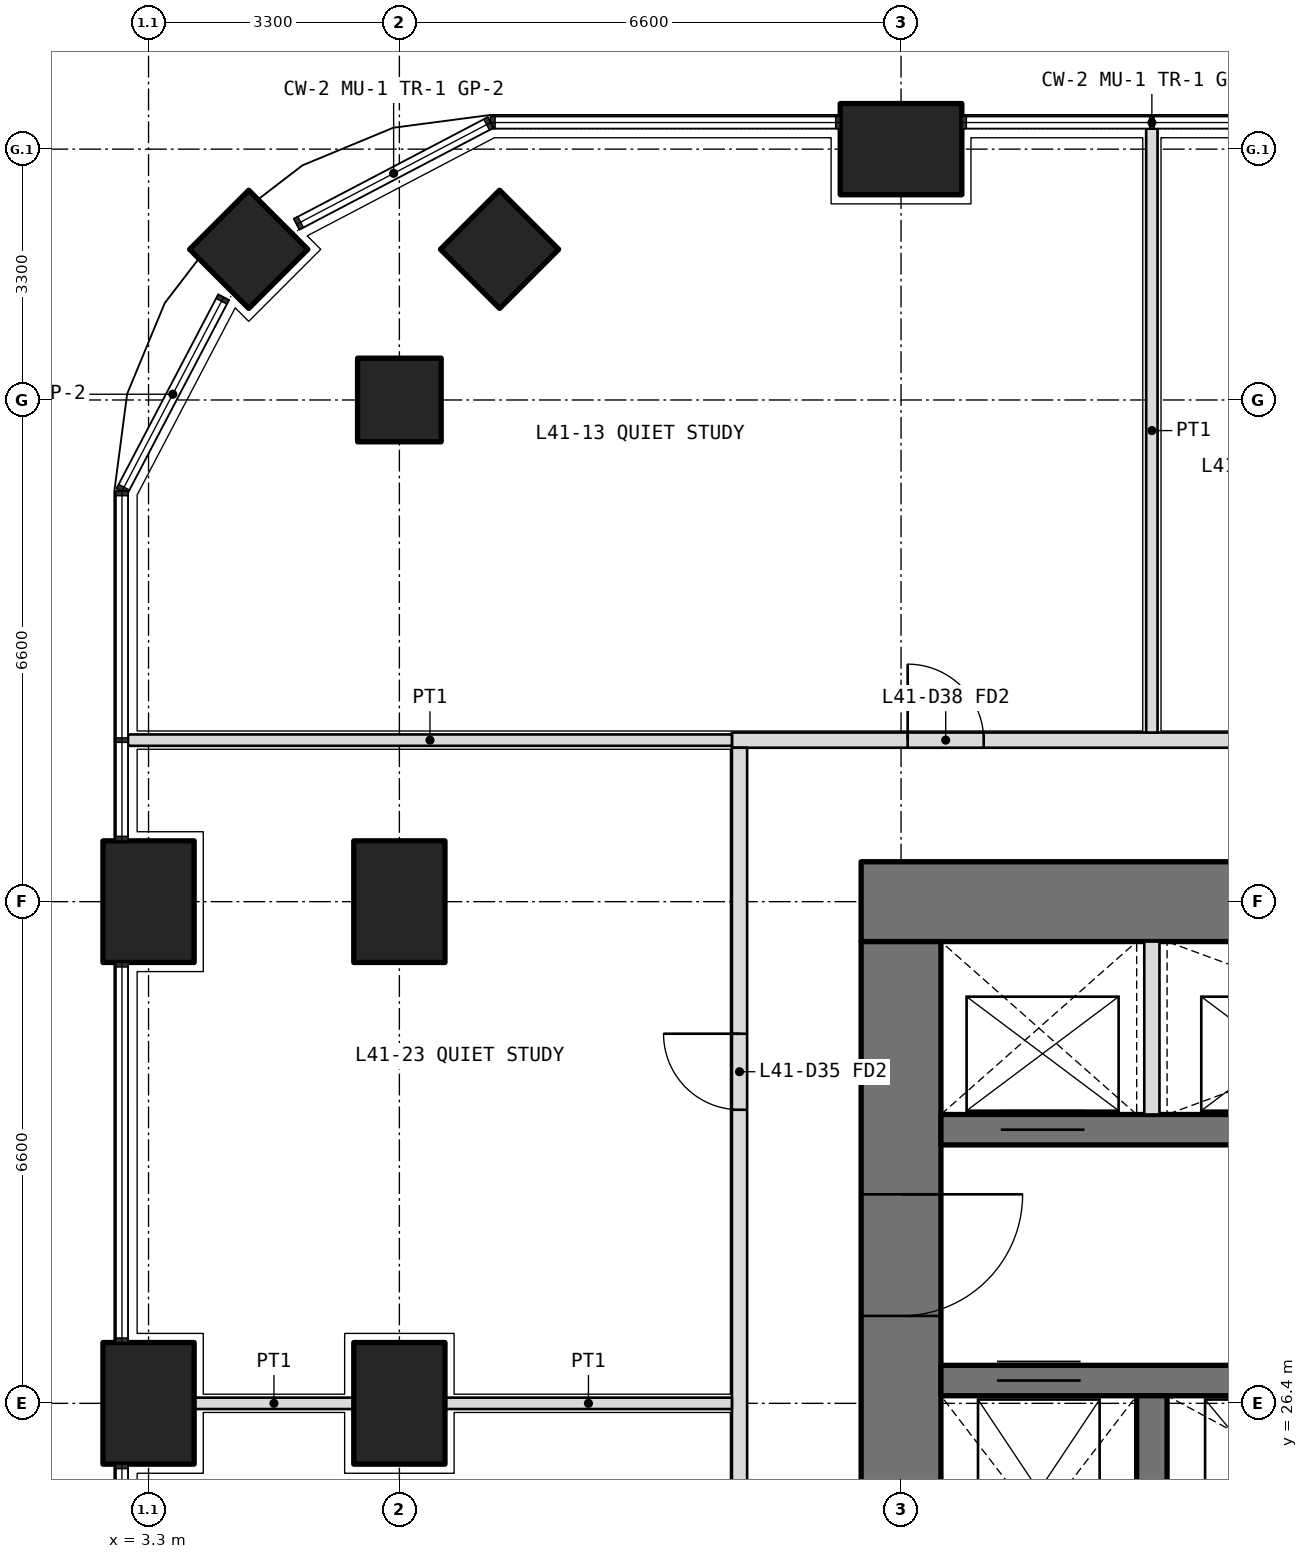
"""IFC4 building model, lengths in metres.
Left out: names, types, materials, properties, quantities, classifications, styles, units other than length and angle.
Written with IfcOpenShell. Run it as: python <this file> out.ifc"""

import sys

from ifc_helpers import new_model, si_unit, direction, frame, frame_2d, origin, origin_2d, place, context, subcontext, project, spatial, rectangle, extrude, element, fill, save


model = new_model("IFC4")
c1 = context("Model", 3, precision=1e-05, world=origin(), true_north=direction((0.0, 1.0)))
c2 = subcontext(c1, "Body", "Model", "MODEL_VIEW")
j1 = project(units=[si_unit("LENGTHUNIT", "METRE"), si_unit("PLANEANGLEUNIT", "RADIAN")], contexts=[c1])
p1 = place(None, origin())
s1 = spatial("IfcSite", under=j1, at=p1, CompositionType="ELEMENT")
p2 = place(p1, origin())
s2 = spatial("IfcBuilding", under=s1, at=p2, CompositionType="ELEMENT")
p3 = place(p2, frame((0.0, 0.0, 180.9)))
s3 = spatial("IfcBuildingStorey", under=s2, at=p3, CompositionType="ELEMENT", Elevation=180.9)
p4 = place(p3, frame((4.618, 41.582, 0.0), z_axis=(0.0, 0.0, 1.0), x_axis=(0.707106781187, 0.707106781187, 0.0)))
e1 = element("IfcColumn", 1, at=p4, inside=s3, PredefinedType="COLUMN", context=c2, shape_type="SweptSolid", body=[
    extrude(rectangle(XDim=1.1, YDim=1.1, at=origin_2d()), origin(), (0.0, 0.0, 1.0), 4.2),
])
for number, where, z_axis, x_axis in (
    (2, (3.3, 26.4, 0.0), (0.0, 0.0, 1.0), (0.0, 1.0, 0.0)),
    (3, (3.3, 33.0, 0.0), (0.0, 0.0, 1.0), (0.0, 1.0, 0.0)),
    (4, (13.2, 42.9, 0.0), (0.0, 0.0, 1.0), (1.0, 0.0, 0.0)),
):
    element("IfcColumn", number, at=place(p3, frame(where, z_axis=z_axis, x_axis=x_axis)), inside=s3, PredefinedType="COLUMN", context=c2, shape_type="SweptSolid", body=[
        extrude(rectangle(XDim=1.6, YDim=1.2, at=origin_2d()), origin(), (0.0, 0.0, 1.0), 4.2),
    ])
for number, where, z_axis, x_axis in (
    (5, (6.6, 39.6, 0.0), (0.0, 0.0, 1.0), (1.0, 0.0, 0.0)),
    (6, (7.918, 41.582, 0.0), (0.0, 0.0, 1.0), (0.707, 0.707, 0.0)),
):
    element("IfcColumn", number, at=place(p3, frame(where, z_axis=z_axis, x_axis=x_axis)), inside=s3, PredefinedType="COLUMN", context=c2, shape_type="SweptSolid", body=[
        extrude(rectangle(XDim=1.1, YDim=1.1, at=origin_2d()), origin(), (0.0, 0.0, 1.0), 4.2),
    ])
for number, where, z_axis, x_axis in (
    (7, (6.6, 26.4, 0.0), (0.0, 0.0, 1.0), (0.0, 1.0, 0.0)),
    (8, (6.6, 33.0, 0.0), (0.0, 0.0, 1.0), (0.0, 1.0, 0.0)),
):
    element("IfcColumn", number, at=place(p3, frame(where, z_axis=z_axis, x_axis=x_axis)), inside=s3, PredefinedType="COLUMN", context=c2, shape_type="SweptSolid", body=[
        extrude(rectangle(XDim=1.6, YDim=1.2, at=origin_2d()), origin(), (0.0, 0.0, 1.0), 4.2),
    ])
p5 = place(p3, frame((40.125, 33.0, 0.0), z_axis=(0.0, 0.0, 1.0), x_axis=(-1.0, 0.0, 0.0)))
e9 = element("IfcWall", 9, at=p5, inside=s3, PredefinedType="SHEAR", context=c2, shape_type="SweptSolid", body=[
    extrude(rectangle(XDim=27.45, YDim=1.05, at=frame_2d((13.725, 0.0))), origin(), (0.0, 0.0, 1.0), 4.2),
])
p6 = place(p3, frame((13.2, 32.475, 0.0), z_axis=(0.0, 0.0, 1.0), x_axis=(0.0, -1.0, 0.0)))
e10 = element("IfcWall", 10, at=p6, inside=s3, PredefinedType="SHEAR", context=c2, shape_type="SweptSolid", body=[
    extrude(rectangle(XDim=18.75, YDim=1.05, at=frame_2d((9.375, 0.0))), origin(), (0.0, 0.0, 1.0), 4.2),
])
p7 = place(p6, frame((14.125, 0.0, 0.0)))
e11 = element("IfcOpeningElement", 11, at=p7, cuts=e10, PredefinedType="OPENING", context=c2, shape_type="SweptSolid", body=[
    extrude(rectangle(XDim=1.6, YDim=2.1, at=frame_2d((0.8, 1.05))), frame((0.0, 0.535, 0.0), z_axis=(0.0, -1.0, 0.0), x_axis=(1.0, 0.0, 0.0)), (0.0, 0.0, 1.0), 1.07),
])
p8 = place(p6, frame((3.325, 0.0, 0.0)))
e12 = element("IfcOpeningElement", 12, at=p8, cuts=e10, PredefinedType="OPENING", context=c2, shape_type="SweptSolid", body=[
    extrude(rectangle(XDim=1.6, YDim=2.1, at=frame_2d((0.8, 1.05))), frame((0.0, 0.535, 0.0), z_axis=(0.0, -1.0, 0.0), x_axis=(1.0, 0.0, 0.0)), (0.0, 0.0, 1.0), 1.07),
])
p9 = place(p3, frame((13.725, 26.7, 0.0), z_axis=(0.0, 0.0, 1.0), x_axis=(1.0, 0.0, 0.0)))
e13 = element("IfcWall", 13, at=p9, inside=s3, PredefinedType="SHEAR", context=c2, shape_type="SweptSolid", body=[
    extrude(rectangle(XDim=25.35, YDim=0.4, at=frame_2d((12.675, 0.0))), origin(), (0.0, 0.0, 1.0), 4.2),
])
p10 = place(p9, frame((23.95, 0.0, 0.0)))
e14 = element("IfcOpeningElement", 14, at=p10, cuts=e13, PredefinedType="OPENING", context=c2, shape_type="SweptSolid", body=[
    extrude(rectangle(XDim=1.2, YDim=2.1, at=frame_2d((0.6, 1.05))), frame((0.0, 0.21, 0.0), z_axis=(0.0, -1.0, 0.0), x_axis=(1.0, 0.0, 0.0)), (0.0, 0.0, 1.0), 0.42),
])
p11 = place(p9, frame((0.738, 0.0, 0.0)))
e15 = element("IfcOpeningElement", 15, at=p11, cuts=e13, PredefinedType="OPENING", context=c2, shape_type="SweptSolid", body=[
    extrude(rectangle(XDim=1.1, YDim=2.1, at=frame_2d((0.55, 1.05))), frame((0.0, 0.21, 0.0), z_axis=(0.0, -1.0, 0.0), x_axis=(1.0, 0.0, 0.0)), (0.0, 0.0, 1.0), 0.42),
])
p12 = place(p9, frame((3.925, 0.0, 0.0)))
e16 = element("IfcOpeningElement", 16, at=p12, cuts=e13, PredefinedType="OPENING", context=c2, shape_type="SweptSolid", body=[
    extrude(rectangle(XDim=1.1, YDim=2.1, at=frame_2d((0.55, 1.05))), frame((0.0, 0.21, 0.0), z_axis=(0.0, -1.0, 0.0), x_axis=(1.0, 0.0, 0.0)), (0.0, 0.0, 1.0), 0.42),
])
p13 = place(p9, frame((7.175, 0.0, 0.0)))
e17 = element("IfcOpeningElement", 17, at=p13, cuts=e13, PredefinedType="OPENING", context=c2, shape_type="SweptSolid", body=[
    extrude(rectangle(XDim=1.1, YDim=2.1, at=frame_2d((0.55, 1.05))), frame((0.0, 0.21, 0.0), z_axis=(0.0, -1.0, 0.0), x_axis=(1.0, 0.0, 0.0)), (0.0, 0.0, 1.0), 0.42),
])
p14 = place(p9, frame((10.425, 0.0, 0.0)))
e18 = element("IfcOpeningElement", 18, at=p14, cuts=e13, PredefinedType="OPENING", context=c2, shape_type="SweptSolid", body=[
    extrude(rectangle(XDim=1.1, YDim=2.1, at=frame_2d((0.55, 1.05))), frame((0.0, 0.21, 0.0), z_axis=(0.0, -1.0, 0.0), x_axis=(1.0, 0.0, 0.0)), (0.0, 0.0, 1.0), 0.42),
])
p15 = place(p9, frame((13.775, 0.0, 0.0)))
e19 = element("IfcOpeningElement", 19, at=p15, cuts=e13, PredefinedType="OPENING", context=c2, shape_type="SweptSolid", body=[
    extrude(rectangle(XDim=1.1, YDim=2.1, at=frame_2d((0.55, 1.05))), frame((0.0, 0.21, 0.0), z_axis=(0.0, -1.0, 0.0), x_axis=(1.0, 0.0, 0.0)), (0.0, 0.0, 1.0), 0.42),
])
p16 = place(p3, frame((13.725, 30.0, 0.0), z_axis=(0.0, 0.0, 1.0), x_axis=(1.0, 0.0, 0.0)))
e20 = element("IfcWall", 20, at=p16, inside=s3, PredefinedType="SHEAR", context=c2, shape_type="SweptSolid", body=[
    extrude(rectangle(XDim=25.35, YDim=0.4, at=frame_2d((12.675, 0.0))), origin(), (0.0, 0.0, 1.0), 4.2),
])
p17 = place(p16, frame((0.788, 0.0, 0.0)))
e21 = element("IfcOpeningElement", 21, at=p17, cuts=e20, PredefinedType="OPENING", context=c2, shape_type="SweptSolid", body=[
    extrude(rectangle(XDim=1.1, YDim=2.1, at=frame_2d((0.55, 1.05))), frame((0.0, 0.21, 0.0), z_axis=(0.0, -1.0, 0.0), x_axis=(1.0, 0.0, 0.0)), (0.0, 0.0, 1.0), 0.42),
])
p18 = place(p16, frame((3.875, 0.0, 0.0)))
e22 = element("IfcOpeningElement", 22, at=p18, cuts=e20, PredefinedType="OPENING", context=c2, shape_type="SweptSolid", body=[
    extrude(rectangle(XDim=1.1, YDim=2.1, at=frame_2d((0.55, 1.05))), frame((0.0, 0.21, 0.0), z_axis=(0.0, -1.0, 0.0), x_axis=(1.0, 0.0, 0.0)), (0.0, 0.0, 1.0), 0.42),
])
p19 = place(p16, frame((7.175, 0.0, 0.0)))
e23 = element("IfcOpeningElement", 23, at=p19, cuts=e20, PredefinedType="OPENING", context=c2, shape_type="SweptSolid", body=[
    extrude(rectangle(XDim=1.1, YDim=2.1, at=frame_2d((0.55, 1.05))), frame((0.0, 0.21, 0.0), z_axis=(0.0, -1.0, 0.0), x_axis=(1.0, 0.0, 0.0)), (0.0, 0.0, 1.0), 0.42),
])
p20 = place(p16, frame((10.475, 0.0, 0.0)))
e24 = element("IfcOpeningElement", 24, at=p20, cuts=e20, PredefinedType="OPENING", context=c2, shape_type="SweptSolid", body=[
    extrude(rectangle(XDim=1.1, YDim=2.1, at=frame_2d((0.55, 1.05))), frame((0.0, 0.21, 0.0), z_axis=(0.0, -1.0, 0.0), x_axis=(1.0, 0.0, 0.0)), (0.0, 0.0, 1.0), 0.42),
])
p21 = place(p3, frame((16.5, 23.15, 0.0), z_axis=(0.0, 0.0, 1.0), x_axis=(0.0, 1.0, 0.0)))
e25 = element("IfcWall", 25, at=p21, inside=s3, PredefinedType="SHEAR", context=c2, shape_type="SweptSolid", body=[
    extrude(rectangle(XDim=3.35, YDim=0.4, at=frame_2d((1.675, 0.0))), origin(), (0.0, 0.0, 1.0), 4.2),
])
p22 = place(p3, frame((16.5, 30.2, 0.0), z_axis=(0.0, 0.0, 1.0), x_axis=(0.0, 1.0, 0.0)))
e26 = element("IfcWall", 26, at=p22, inside=s3, PredefinedType="PARTITIONING", context=c2, shape_type="SweptSolid", body=[
    extrude(rectangle(XDim=2.275, YDim=0.2, at=frame_2d((1.138, 0.0))), origin(), (0.0, 0.0, 1.0), 4.2),
])
p23 = place(p3, frame((10.975, 35.125, 0.0), z_axis=(0.0, 0.0, 1.0), x_axis=(1.0, 0.0, 0.0)))
e27 = element("IfcWall", 27, at=p23, inside=s3, PredefinedType="PARTITIONING", context=c2, shape_type="SweptSolid", body=[
    extrude(rectangle(XDim=30.85, YDim=0.2, at=frame_2d((15.425, 0.0))), origin(), (0.0, 0.0, 1.0), 2.85),
])
p24 = place(p23, frame((2.312, 0.0, 0.0)))
e28 = element("IfcOpeningElement", 28, at=p24, cuts=e27, PredefinedType="OPENING", context=c2, shape_type="SweptSolid", body=[
    extrude(rectangle(XDim=1.0, YDim=2.1, at=frame_2d((0.5, 1.05))), frame((0.0, 0.11, 0.0), z_axis=(0.0, -1.0, 0.0), x_axis=(1.0, 0.0, 0.0)), (0.0, 0.0, 1.0), 0.22),
])
p25 = place(p23, frame((7.125, 0.0, 0.0)))
e29 = element("IfcOpeningElement", 29, at=p25, cuts=e27, PredefinedType="OPENING", context=c2, shape_type="SweptSolid", body=[
    extrude(rectangle(XDim=1.0, YDim=2.1, at=frame_2d((0.5, 1.05))), frame((0.0, 0.11, 0.0), z_axis=(0.0, -1.0, 0.0), x_axis=(1.0, 0.0, 0.0)), (0.0, 0.0, 1.0), 0.22),
])
p26 = place(p23, frame((10.425, 0.0, 0.0)))
e30 = element("IfcOpeningElement", 30, at=p26, cuts=e27, PredefinedType="OPENING", context=c2, shape_type="SweptSolid", body=[
    extrude(rectangle(XDim=1.0, YDim=2.1, at=frame_2d((0.5, 1.05))), frame((0.0, 0.11, 0.0), z_axis=(0.0, -1.0, 0.0), x_axis=(1.0, 0.0, 0.0)), (0.0, 0.0, 1.0), 0.22),
])
p27 = place(p23, frame((16.575, 0.0, 0.0)))
e31 = element("IfcOpeningElement", 31, at=p27, cuts=e27, PredefinedType="OPENING", context=c2, shape_type="SweptSolid", body=[
    extrude(rectangle(XDim=1.0, YDim=2.1, at=frame_2d((0.5, 1.05))), frame((0.0, 0.11, 0.0), z_axis=(0.0, -1.0, 0.0), x_axis=(1.0, 0.0, 0.0)), (0.0, 0.0, 1.0), 0.22),
])
p28 = place(p23, frame((25.887, 0.0, 0.0)))
e32 = element("IfcOpeningElement", 32, at=p28, cuts=e27, PredefinedType="OPENING", context=c2, shape_type="SweptSolid", body=[
    extrude(rectangle(XDim=1.0, YDim=2.1, at=frame_2d((0.5, 1.05))), frame((0.0, 0.11, 0.0), z_axis=(0.0, -1.0, 0.0), x_axis=(1.0, 0.0, 0.0)), (0.0, 0.0, 1.0), 0.22),
])
p29 = place(p3, frame((11.075, 11.175, 0.0), z_axis=(0.0, 0.0, 1.0), x_axis=(0.0, 1.0, 0.0)))
e33 = element("IfcWall", 33, at=p29, inside=s3, PredefinedType="PARTITIONING", context=c2, shape_type="SweptSolid", body=[
    extrude(rectangle(XDim=23.85, YDim=0.2, at=frame_2d((11.925, 0.0))), origin(), (0.0, 0.0, 1.0), 2.85),
])
p30 = place(p29, frame((0.462, 0.0, 0.0)))
e34 = element("IfcOpeningElement", 34, at=p30, cuts=e33, PredefinedType="OPENING", context=c2, shape_type="SweptSolid", body=[
    extrude(rectangle(XDim=1.0, YDim=2.1, at=frame_2d((0.5, 1.05))), frame((0.0, 0.11, 0.0), z_axis=(0.0, -1.0, 0.0), x_axis=(1.0, 0.0, 0.0)), (0.0, 0.0, 1.0), 0.22),
])
p31 = place(p29, frame((2.575, 0.0, 0.0)))
e35 = element("IfcOpeningElement", 35, at=p31, cuts=e33, PredefinedType="OPENING", context=c2, shape_type="SweptSolid", body=[
    extrude(rectangle(XDim=1.0, YDim=2.1, at=frame_2d((0.5, 1.05))), frame((0.0, 0.11, 0.0), z_axis=(0.0, -1.0, 0.0), x_axis=(1.0, 0.0, 0.0)), (0.0, 0.0, 1.0), 0.22),
])
p32 = place(p29, frame((5.625, 0.0, 0.0)))
e36 = element("IfcOpeningElement", 36, at=p32, cuts=e33, PredefinedType="OPENING", context=c2, shape_type="SweptSolid", body=[
    extrude(rectangle(XDim=0.9, YDim=2.1, at=frame_2d((0.45, 1.05))), frame((0.0, 0.11, 0.0), z_axis=(0.0, -1.0, 0.0), x_axis=(1.0, 0.0, 0.0)), (0.0, 0.0, 1.0), 0.22),
])
p33 = place(p29, frame((9.425, 0.0, 0.0)))
e37 = element("IfcOpeningElement", 37, at=p33, cuts=e33, PredefinedType="OPENING", context=c2, shape_type="SweptSolid", body=[
    extrude(rectangle(XDim=0.9, YDim=2.1, at=frame_2d((0.45, 1.05))), frame((0.0, 0.11, 0.0), z_axis=(0.0, -1.0, 0.0), x_axis=(1.0, 0.0, 0.0)), (0.0, 0.0, 1.0), 0.22),
])
p34 = place(p29, frame((12.975, 0.0, 0.0)))
e38 = element("IfcOpeningElement", 38, at=p34, cuts=e33, PredefinedType="OPENING", context=c2, shape_type="SweptSolid", body=[
    extrude(rectangle(XDim=1.0, YDim=2.1, at=frame_2d((0.5, 1.05))), frame((0.0, 0.11, 0.0), z_axis=(0.0, -1.0, 0.0), x_axis=(1.0, 0.0, 0.0)), (0.0, 0.0, 1.0), 0.22),
])
p35 = place(p29, frame((19.087, 0.0, 0.0)))
e39 = element("IfcOpeningElement", 39, at=p35, cuts=e33, PredefinedType="OPENING", context=c2, shape_type="SweptSolid", body=[
    extrude(rectangle(XDim=1.0, YDim=2.1, at=frame_2d((0.5, 1.05))), frame((0.0, 0.11, 0.0), z_axis=(0.0, -1.0, 0.0), x_axis=(1.0, 0.0, 0.0)), (0.0, 0.0, 1.0), 0.22),
])
p36 = place(p3, frame((3.03, 35.125, 0.0), z_axis=(0.0, 0.0, 1.0), x_axis=(1.0, 0.0, 0.0)))
e40 = element("IfcWall", 40, at=p36, inside=s3, PredefinedType="PARTITIONING", context=c2, shape_type="SweptSolid", body=[
    extrude(rectangle(XDim=7.945, YDim=0.15, at=frame_2d((3.973, 0.0))), origin(), (0.0, 0.0, 1.0), 2.7),
])
p37 = place(p3, frame((16.5, 43.17, 0.0), z_axis=(0.0, 0.0, 1.0), x_axis=(0.0, -1.0, 0.0)))
e41 = element("IfcWall", 41, at=p37, inside=s3, PredefinedType="PARTITIONING", context=c2, shape_type="SweptSolid", body=[
    extrude(rectangle(XDim=7.945, YDim=0.15, at=frame_2d((3.972, 0.0))), origin(), (0.0, 0.0, 1.0), 2.7),
])
p38 = place(p3, frame((3.9, 26.4, 0.0), z_axis=(0.0, 0.0, 1.0), x_axis=(1.0, 0.0, 0.0)))
e42 = element("IfcWall", 42, at=p38, inside=s3, PredefinedType="PARTITIONING", context=c2, shape_type="SweptSolid", body=[
    extrude(rectangle(XDim=2.1, YDim=0.15, at=frame_2d((1.05, 0.0))), origin(), (0.0, 0.0, 1.0), 2.85),
])
p39 = place(p3, frame((7.2, 26.4, 0.0), z_axis=(0.0, 0.0, 1.0), x_axis=(1.0, 0.0, 0.0)))
e43 = element("IfcWall", 43, at=p39, inside=s3, PredefinedType="PARTITIONING", context=c2, shape_type="SweptSolid", body=[
    extrude(rectangle(XDim=3.775, YDim=0.15, at=frame_2d((1.888, 0.0))), origin(), (0.0, 0.0, 1.0), 2.85),
])
p40 = place(p24, origin())
e44 = element("IfcDoor", 44, at=p40, inside=s3, OperationType="SINGLE_SWING_LEFT", PredefinedType="DOOR", context=c2, shape_type="SweptSolid", body=[
    extrude(rectangle(XDim=1.0, YDim=2.1, at=frame_2d((0.5, 1.05))), frame((0.0, 0.025, 0.0), z_axis=(0.0, -1.0, 0.0), x_axis=(1.0, 0.0, 0.0)), (0.0, 0.0, 1.0), 0.05),
])
fill(e28, e44)
p41 = place(p35, origin())
e45 = element("IfcDoor", 45, at=p41, inside=s3, OperationType="SINGLE_SWING_RIGHT", PredefinedType="DOOR", context=c2, shape_type="SweptSolid", body=[
    extrude(rectangle(XDim=1.0, YDim=2.1, at=frame_2d((0.5, 1.05))), frame((0.0, 0.025, 0.0), z_axis=(0.0, -1.0, 0.0), x_axis=(1.0, 0.0, 0.0)), (0.0, 0.0, 1.0), 0.05),
])
fill(e39, e45)
p42 = place(p8, origin())
e46 = element("IfcDoor", 46, at=p42, inside=s3, OperationType="DOUBLE_DOOR_DOUBLE_SWING", PredefinedType="DOOR", context=c2, shape_type="SweptSolid", body=[
    extrude(rectangle(XDim=1.6, YDim=2.1, at=frame_2d((0.8, 1.05))), frame((0.0, 0.025, 0.0), z_axis=(0.0, -1.0, 0.0), x_axis=(1.0, 0.0, 0.0)), (0.0, 0.0, 1.0), 0.05),
])
fill(e12, e46)
p43 = place(p17, origin())
e47 = element("IfcDoor", 47, at=p43, inside=s3, OperationType="DOUBLE_DOOR_SLIDING", PredefinedType="DOOR", context=c2, shape_type="SweptSolid", body=[
    extrude(rectangle(XDim=1.1, YDim=2.1, at=frame_2d((0.55, 1.05))), frame((0.0, 0.025, 0.0), z_axis=(0.0, -1.0, 0.0), x_axis=(1.0, 0.0, 0.0)), (0.0, 0.0, 1.0), 0.05),
])
fill(e21, e47)
p44 = place(p11, origin())
e48 = element("IfcDoor", 48, at=p44, inside=s3, OperationType="DOUBLE_DOOR_SLIDING", PredefinedType="DOOR", context=c2, shape_type="SweptSolid", body=[
    extrude(rectangle(XDim=1.1, YDim=2.1, at=frame_2d((0.55, 1.05))), frame((0.0, 0.025, 0.0), z_axis=(0.0, -1.0, 0.0), x_axis=(1.0, 0.0, 0.0)), (0.0, 0.0, 1.0), 0.05),
])
fill(e15, e48)
save(model, sys.argv[1])
